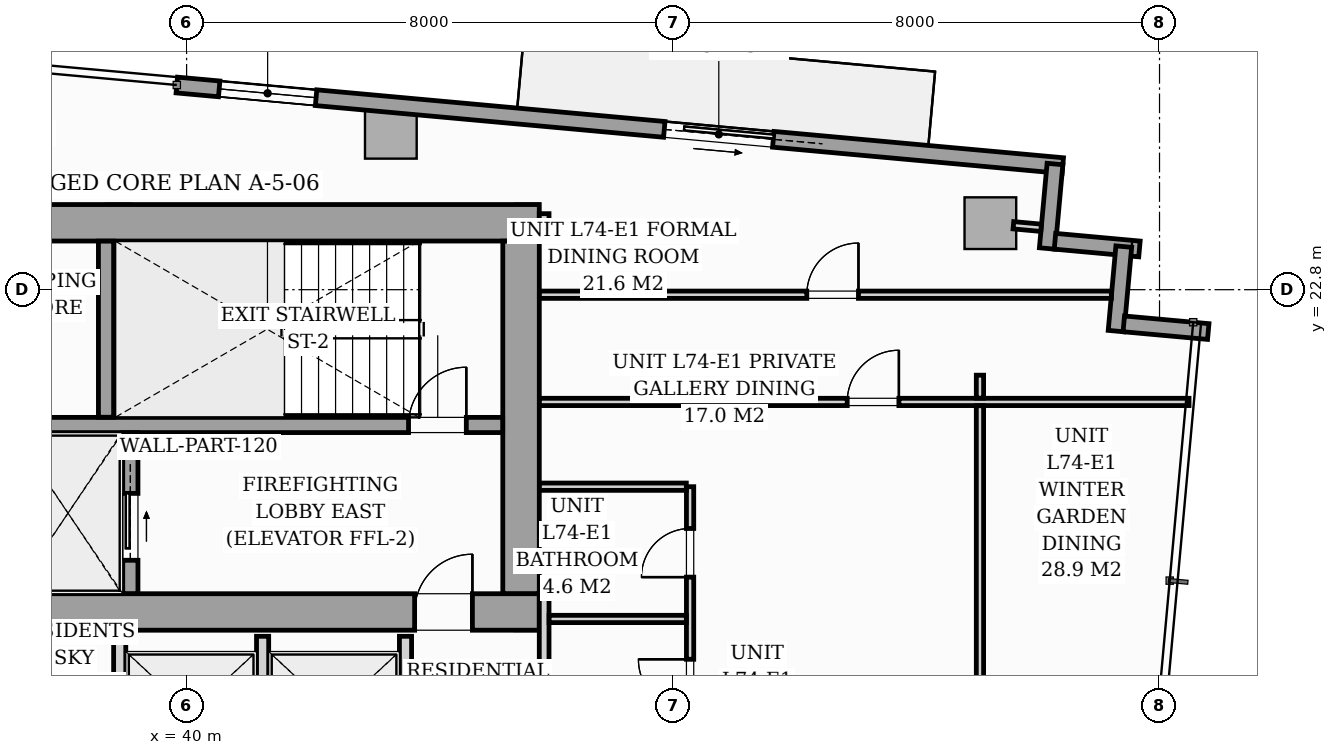
"""IFC4 building model, lengths in metres.
Left out: names, types, materials, properties, quantities, classifications, styles, units other than length and angle.
Written with IfcOpenShell. Run it as: python <this file> out.ifc"""

import sys

from ifc_helpers import new_model, si_unit, direction, frame, frame_2d, origin, origin_2d, place, context, subcontext, project, spatial, rectangle, i_section, extrude, source, transform, mapped, element, fill, save


model = new_model("IFC4")
c1 = context("Model", 3, precision=1e-05, world=origin(), true_north=direction((0.0, 1.0)))
c2 = subcontext(c1, "Body", "Model", "MODEL_VIEW")
j1 = project(units=[si_unit("LENGTHUNIT", "METRE"), si_unit("PLANEANGLEUNIT", "RADIAN")], contexts=[c1])
p1 = place(None, origin())
s1 = spatial("IfcSite", under=j1, at=p1, CompositionType="ELEMENT")
p2 = place(p1, origin())
s2 = spatial("IfcBuilding", under=s1, at=p2, CompositionType="ELEMENT")
p3 = place(p2, frame((0.0, 0.0, 256.2)))
s3 = spatial("IfcBuildingStorey", under=s2, at=p3, CompositionType="ELEMENT", Elevation=256.2)
m1 = source(origin(), c2, "Body", "SweptSolid", [
    extrude(i_section(OverallWidth=0.409, OverallDepth=0.425, WebThickness=0.033, FlangeThickness=0.052, FilletRadius=0.018, at=origin_2d()), origin(), (0.0, 0.0, 1.0), 3.296),
])
for number, where, z_axis, x_axis in (
    (1, (38.88, 17.4, 0.002), (0.0, 0.0, 1.0), (1.0, 0.0, 0.0)),
    (2, (45.6, 17.4, 0.002), (0.0, 0.0, 1.0), (1.0, 0.0, 0.0)),
    (3, (38.88, 24.0, 0.002), (0.0, 0.0, 1.0), (1.0, 0.0, 0.0)),
    (4, (45.6, 24.0, 0.002), (0.0, 0.0, 1.0), (1.0, 0.0, 0.0)),
):
    element("IfcColumn", number, at=place(p3, frame(where, z_axis=z_axis, x_axis=x_axis)), inside=s3, PredefinedType="PILASTER", context=c2, shape_type="MappedRepresentation", body=[
        mapped(m1, transform((0.0, 0.0, 0.0), scale=1.0)),
    ])
m2 = source(origin(), c2, "Body", "SweptSolid", [
    extrude(rectangle(XDim=0.85, YDim=0.85, at=origin_2d()), origin(), (0.0, 0.0, 1.0), 3.294),
])
for number, where, z_axis, x_axis in (
    (5, (43.359, 25.38, 0.002), (0.0, 0.0, 1.0), (0.996, -0.091, 0.0)),
    (6, (53.218, 23.894, 0.002), (0.0, 0.0, 1.0), (0.996, -0.091, 0.0)),
    (7, (54.889, 15.99, 0.002), (0.0, 0.0, 1.0), (0.996, -0.091, 0.0)),
):
    element("IfcColumn", number, at=place(p3, frame(where, z_axis=z_axis, x_axis=x_axis)), inside=s3, PredefinedType="COLUMN", context=c2, shape_type="MappedRepresentation", body=[
        mapped(m2, transform((0.0, 0.0, 0.0), scale=1.0)),
    ])
p4 = place(p3, frame((39.839, 26.166, 0.0), z_axis=(0.0, 0.0, 1.0), x_axis=(0.995884447498, -0.090632043071, 0.0)))
e8 = element("IfcWall", 8, at=p4, inside=s3, PredefinedType="STANDARD", context=c2, shape_type="SweptSolid", body=[
    extrude(rectangle(XDim=14.63, YDim=0.26, at=frame_2d((7.315, 0.0))), origin(), (0.0, 0.0, 1.0), 3.0),
])
p5 = place(p4, frame((8.05, 0.0, 0.0)))
e9 = element("IfcOpeningElement", 9, at=p5, cuts=e8, PredefinedType="OPENING", context=c2, shape_type="SweptSolid", body=[
    extrude(rectangle(XDim=1.8, YDim=2.06, at=frame_2d((0.9, 1.03))), frame((0.0, 0.14, 0.0), z_axis=(0.0, -1.0, 0.0), x_axis=(1.0, 0.0, 0.0)), (0.0, 0.0, 1.0), 0.28),
])
p6 = place(p4, frame((0.7, 0.0, 0.65)))
e10 = element("IfcOpeningElement", 10, at=p6, cuts=e8, PredefinedType="OPENING", context=c2, shape_type="SweptSolid", body=[
    extrude(rectangle(XDim=1.6, YDim=1.5, at=frame_2d((0.8, 0.75))), frame((0.0, 0.14, 0.0), z_axis=(0.0, -1.0, 0.0), x_axis=(1.0, 0.0, 0.0)), (0.0, 0.0, 1.0), 0.28),
])
p7 = place(p3, frame((54.281, 24.866, 0.0), z_axis=(0.0, 0.0, 1.0), x_axis=(-0.090661991521, -0.995881721538, 0.0)))
e11 = element("IfcWall", 11, at=p7, inside=s3, PredefinedType="STANDARD", context=c2, shape_type="SweptSolid", body=[
    extrude(rectangle(XDim=1.395, YDim=0.26, at=frame_2d((0.698, 0.0))), origin(), (0.0, 0.0, 1.0), 3.0),
])
for number, where, z_axis, x_axis in (
    (12, (54.281, 23.596, 0.0), (0.0, 0.0, 1.0), (0.996, -0.091, 0.0)),
    (13, (55.412, 23.508, 0.0), (0.0, 0.0, 1.0), (-0.091, -0.996, 0.0)),
    (14, (55.412, 22.238, 0.0), (0.0, 0.0, 1.0), (0.996, -0.091, 0.0)),
):
    element("IfcWall", number, at=place(p3, frame(where, z_axis=z_axis, x_axis=x_axis)), inside=s3, PredefinedType="STANDARD", context=c2, shape_type="SweptSolid", body=[
        extrude(rectangle(XDim=1.395, YDim=0.26, at=frame_2d((0.698, 0.0))), origin(), (0.0, 0.0, 1.0), 3.0),
    ])
p8 = place(p3, frame((26.2, 17.5, 0.0), z_axis=(0.0, 0.0, 1.0), x_axis=(1.0, 0.0, 0.0)))
e15 = element("IfcWall", 15, at=p8, inside=s3, PredefinedType="SHEAR", context=c2, shape_type="SweptSolid", body=[
    extrude(rectangle(XDim=19.6, YDim=0.6, at=frame_2d((9.8, 0.0))), origin(), (0.0, 0.0, 1.0), 3.3),
])
p9 = place(p8, frame((0.95, 0.0, 0.0)))
e16 = element("IfcOpeningElement", 16, at=p9, cuts=e15, PredefinedType="OPENING", context=c2, shape_type="SweptSolid", body=[
    extrude(rectangle(XDim=0.95, YDim=2.06, at=frame_2d((0.475, 1.03))), frame((0.0, 0.31, 0.0), z_axis=(0.0, -1.0, 0.0), x_axis=(1.0, 0.0, 0.0)), (0.0, 0.0, 1.0), 0.62),
])
p10 = place(p8, frame((9.38, 0.0, 0.0)))
e17 = element("IfcOpeningElement", 17, at=p10, cuts=e15, PredefinedType="OPENING", context=c2, shape_type="SweptSolid", body=[
    extrude(rectangle(XDim=0.85, YDim=2.0, at=frame_2d((0.425, 1.0))), frame((0.0, 0.31, 0.0), z_axis=(0.0, -1.0, 0.0), x_axis=(1.0, 0.0, 0.0)), (0.0, 0.0, 1.0), 0.62),
])
p11 = place(p8, frame((17.55, 0.0, 0.0)))
e18 = element("IfcOpeningElement", 18, at=p11, cuts=e15, PredefinedType="OPENING", context=c2, shape_type="SweptSolid", body=[
    extrude(rectangle(XDim=0.95, YDim=2.06, at=frame_2d((0.475, 1.03))), frame((0.0, 0.31, 0.0), z_axis=(0.0, -1.0, 0.0), x_axis=(1.0, 0.0, 0.0)), (0.0, 0.0, 1.0), 0.62),
])
p12 = place(p3, frame((26.2, 23.9, 0.0), z_axis=(0.0, 0.0, 1.0), x_axis=(1.0, 0.0, 0.0)))
e19 = element("IfcWall", 19, at=p12, inside=s3, PredefinedType="SHEAR", context=c2, shape_type="SweptSolid", body=[
    extrude(rectangle(XDim=19.6, YDim=0.6, at=frame_2d((9.8, 0.0))), origin(), (0.0, 0.0, 1.0), 3.3),
])
p13 = place(p3, frame((45.5, 17.802, 0.0), z_axis=(0.0, 0.0, 1.0), x_axis=(0.0, 1.0, 0.0)))
e20 = element("IfcWall", 20, at=p13, inside=s3, PredefinedType="SHEAR", context=c2, shape_type="SweptSolid", body=[
    extrude(rectangle(XDim=5.796, YDim=0.6, at=frame_2d((2.898, 0.0))), origin(), (0.0, 0.0, 1.0), 3.3),
])
p14 = place(p3, frame((37.05, 20.575, 0.0), z_axis=(0.0, 0.0, 1.0), x_axis=(1.0, 0.0, 0.0)))
e21 = element("IfcWall", 21, at=p14, inside=s3, PredefinedType="SOLIDWALL", context=c2, shape_type="SweptSolid", body=[
    extrude(rectangle(XDim=8.148, YDim=0.25, at=frame_2d((4.074, 0.0))), origin(), (0.0, 0.0, 1.0), 3.3),
])
p15 = place(p14, frame((6.6, 0.0, 0.0)))
e22 = element("IfcOpeningElement", 22, at=p15, cuts=e21, PredefinedType="OPENING", context=c2, shape_type="SweptSolid", body=[
    extrude(rectangle(XDim=0.95, YDim=2.06, at=frame_2d((0.475, 1.03))), frame((0.0, 0.135, 0.0), z_axis=(0.0, -1.0, 0.0), x_axis=(1.0, 0.0, 0.0)), (0.0, 0.0, 1.0), 0.27),
])
p16 = place(p3, frame((38.675, 20.702, 0.0), z_axis=(0.0, 0.0, 1.0), x_axis=(0.0, 1.0, 0.0)))
e23 = element("IfcWall", 23, at=p16, inside=s3, PredefinedType="SOLIDWALL", context=c2, shape_type="SweptSolid", body=[
    extrude(rectangle(XDim=2.896, YDim=0.25, at=frame_2d((1.448, 0.0))), origin(), (0.0, 0.0, 1.0), 3.3),
])
p17 = place(p3, frame((39.075, 17.802, 0.0), z_axis=(0.0, 0.0, 1.0), x_axis=(0.0, 1.0, 0.0)))
e24 = element("IfcWall", 24, at=p17, inside=s3, PredefinedType="SOLIDWALL", context=c2, shape_type="SweptSolid", body=[
    extrude(rectangle(XDim=2.646, YDim=0.25, at=frame_2d((1.323, 0.0))), origin(), (0.0, 0.0, 1.0), 3.3),
])
p18 = place(p17, frame((0.548, 0.0, 0.0)))
e25 = element("IfcOpeningElement", 25, at=p18, cuts=e24, PredefinedType="OPENING", context=c2, shape_type="SweptSolid", body=[
    extrude(rectangle(XDim=1.1, YDim=2.08, at=frame_2d((0.55, 1.04))), frame((0.0, 0.135, 0.0), z_axis=(0.0, -1.0, 0.0), x_axis=(1.0, 0.0, 0.0)), (0.0, 0.0, 1.0), 0.27),
])
for number, where, z_axis, x_axis in (
    (26, (38.9, 14.75, 0.0), (0.0, 0.0, 1.0), (0.0, 1.0, 0.0)),
    (27, (41.25, 14.75, 0.0), (0.0, 0.0, 1.0), (0.0, 1.0, 0.0)),
    (28, (43.6, 14.75, 0.0), (0.0, 0.0, 1.0), (0.0, 1.0, 0.0)),
):
    element("IfcWall", number, at=place(p3, frame(where, z_axis=z_axis, x_axis=x_axis)), inside=s3, PredefinedType="PARTITIONING", context=c2, shape_type="SweptSolid", body=[
        extrude(rectangle(XDim=2.35, YDim=0.2, at=frame_2d((1.175, 0.0))), origin(), (0.0, 0.0, 1.0), 3.0),
    ])
p19 = place(p3, frame((45.88, 13.442, 0.0), z_axis=(0.0, 0.0, 1.0), x_axis=(0.0, 1.0, 0.0)))
e29 = element("IfcWall", 29, at=p19, inside=s3, PredefinedType="PARTITIONING", context=c2, shape_type="SweptSolid", body=[
    extrude(rectangle(XDim=4.36, YDim=0.16, at=frame_2d((2.18, 0.0))), origin(), (0.0, 0.0, 1.0), 3.0),
])
p20 = place(p19, frame((0.493, 0.0, 0.0)))
e30 = element("IfcOpeningElement", 30, at=p20, cuts=e29, PredefinedType="OPENING", context=c2, shape_type="SweptSolid", body=[
    extrude(rectangle(XDim=0.95, YDim=2.06, at=frame_2d((0.475, 1.03))), frame((0.0, 0.09, 0.0), z_axis=(0.0, -1.0, 0.0), x_axis=(1.0, 0.0, 0.0)), (0.0, 0.0, 1.0), 0.18),
])
p21 = place(p3, frame((45.88, 23.598, 0.0), z_axis=(0.0, 0.0, 1.0), x_axis=(0.0, 1.0, 0.0)))
e31 = element("IfcWall", 31, at=p21, inside=s3, PredefinedType="PARTITIONING", context=c2, shape_type="SweptSolid", body=[
    extrude(rectangle(XDim=0.452, YDim=0.16, at=frame_2d((0.226, 0.0))), origin(), (0.0, 0.0, 1.0), 3.0),
])
p22 = place(p3, frame((48.28, 15.21, 0.0), z_axis=(0.0, 0.0, 1.0), x_axis=(0.0, 1.0, 0.0)))
e32 = element("IfcWall", 32, at=p22, inside=s3, PredefinedType="PARTITIONING", context=c2, shape_type="SweptSolid", body=[
    extrude(rectangle(XDim=4.35, YDim=0.12, at=frame_2d((2.175, 0.0))), origin(), (0.0, 0.0, 1.0), 3.0),
])
p23 = place(p22, frame((0.662, 0.0, 0.0)))
e33 = element("IfcOpeningElement", 33, at=p23, cuts=e32, PredefinedType="OPENING", context=c2, shape_type="SweptSolid", body=[
    extrude(rectangle(XDim=0.85, YDim=2.05, at=frame_2d((0.425, 1.025))), frame((0.0, 0.07, 0.0), z_axis=(0.0, -1.0, 0.0), x_axis=(1.0, 0.0, 0.0)), (0.0, 0.0, 1.0), 0.14),
])
p24 = place(p22, frame((2.863, 0.0, 0.0)))
e34 = element("IfcOpeningElement", 34, at=p24, cuts=e32, PredefinedType="OPENING", context=c2, shape_type="SweptSolid", body=[
    extrude(rectangle(XDim=0.8, YDim=2.02, at=frame_2d((0.4, 1.01))), frame((0.0, 0.07, 0.0), z_axis=(0.0, -1.0, 0.0), x_axis=(1.0, 0.0, 0.0)), (0.0, 0.0, 1.0), 0.14),
])
p25 = place(p3, frame((45.962, 17.385, 0.0), z_axis=(0.0, 0.0, 1.0), x_axis=(1.0, 0.0, 0.0)))
e35 = element("IfcWall", 35, at=p25, inside=s3, PredefinedType="PARTITIONING", context=c2, shape_type="SweptSolid", body=[
    extrude(rectangle(XDim=2.256, YDim=0.12, at=frame_2d((1.128, 0.0))), origin(), (0.0, 0.0, 1.0), 2.342),
])
p26 = place(p3, frame((45.802, 19.56, 0.0), z_axis=(0.0, 0.0, 1.0), x_axis=(1.0, 0.0, 0.0)))
e36 = element("IfcWall", 36, at=p26, inside=s3, PredefinedType="PARTITIONING", context=c2, shape_type="SweptSolid", body=[
    extrude(rectangle(XDim=2.416, YDim=0.12, at=frame_2d((1.208, 0.0))), origin(), (0.0, 0.0, 1.0), 3.0),
])
p27 = place(p3, frame((45.802, 22.717, 0.0), z_axis=(0.0, 0.0, 1.0), x_axis=(1.0, 0.0, 0.0)))
e37 = element("IfcWall", 37, at=p27, inside=s3, PredefinedType="PARTITIONING", context=c2, shape_type="SweptSolid", body=[
    extrude(rectangle(XDim=9.406, YDim=0.12, at=frame_2d((4.703, 0.0))), origin(), (0.0, 0.0, 1.0), 3.0),
])
p28 = place(p27, frame((4.397, 0.0, 0.0)))
e38 = element("IfcOpeningElement", 38, at=p28, cuts=e37, PredefinedType="OPENING", context=c2, shape_type="SweptSolid", body=[
    extrude(rectangle(XDim=0.85, YDim=2.05, at=frame_2d((0.425, 1.025))), frame((0.0, 0.07, 0.0), z_axis=(0.0, -1.0, 0.0), x_axis=(1.0, 0.0, 0.0)), (0.0, 0.0, 1.0), 0.14),
])
p29 = place(p3, frame((45.802, 20.954, 0.0), z_axis=(0.0, 0.0, 1.0), x_axis=(1.0, 0.0, 0.0)))
e39 = element("IfcWall", 39, at=p29, inside=s3, PredefinedType="PARTITIONING", context=c2, shape_type="SweptSolid", body=[
    extrude(rectangle(XDim=10.683, YDim=0.12, at=frame_2d((5.342, 0.0))), origin(), (0.0, 0.0, 1.0), 3.0),
])
p30 = place(p29, frame((5.062, 0.0, 0.0)))
e40 = element("IfcOpeningElement", 40, at=p30, cuts=e39, PredefinedType="OPENING", context=c2, shape_type="SweptSolid", body=[
    extrude(rectangle(XDim=0.85, YDim=2.05, at=frame_2d((0.425, 1.025))), frame((0.0, 0.07, 0.0), z_axis=(0.0, -1.0, 0.0), x_axis=(1.0, 0.0, 0.0)), (0.0, 0.0, 1.0), 0.14),
])
p31 = place(p3, frame((53.047, 10.808, 0.0), z_axis=(0.0, 0.0, 1.0), x_axis=(0.0, 1.0, 0.0)))
e41 = element("IfcWall", 41, at=p31, inside=s3, PredefinedType="PARTITIONING", context=c2, shape_type="SweptSolid", body=[
    extrude(rectangle(XDim=10.084, YDim=0.12, at=frame_2d((5.042, 0.0))), origin(), (0.0, 0.0, 1.0), 3.0),
])
p32 = place(p31, frame((3.54, 0.0, 0.0)))
e42 = element("IfcOpeningElement", 42, at=p32, cuts=e41, PredefinedType="OPENING", context=c2, shape_type="SweptSolid", body=[
    extrude(rectangle(XDim=0.85, YDim=2.05, at=frame_2d((0.425, 1.025))), frame((0.0, 0.07, 0.0), z_axis=(0.0, -1.0, 0.0), x_axis=(1.0, 0.0, 0.0)), (0.0, 0.0, 1.0), 0.14),
])
p33 = place(p3, frame((53.047, 21.016, 0.0), z_axis=(0.0, 0.0, 1.0), x_axis=(0.0, 1.0, 0.0)))
e43 = element("IfcWall", 43, at=p33, inside=s3, PredefinedType="PARTITIONING", context=c2, shape_type="SweptSolid", body=[
    extrude(rectangle(XDim=0.378, YDim=0.12, at=frame_2d((0.189, 0.0))), origin(), (0.0, 0.0, 1.0), 3.0),
])
p34 = place(p3, frame((53.597, 23.859, 0.0), z_axis=(0.0, 0.0, 1.0), x_axis=(0.995884462012, -0.090631883588, 0.0)))
e44 = element("IfcWall", 44, at=p34, inside=s3, PredefinedType="PARTITIONING", context=c2, shape_type="SweptSolid", body=[
    extrude(rectangle(XDim=0.458, YDim=0.12, at=frame_2d((0.229, 0.0))), origin(), (0.0, 0.0, 1.0), 3.0),
])
m3 = source(origin(), c2, "Body", "SweptSolid", [
    extrude(rectangle(XDim=1.8, YDim=2.06, at=frame_2d((0.9, 1.03))), frame((0.0, 0.025, 0.0), z_axis=(0.0, -1.0, 0.0), x_axis=(1.0, 0.0, 0.0)), (0.0, 0.0, 1.0), 0.05),
])
p35 = place(p5, origin())
e45 = element("IfcDoor", 45, at=p35, inside=s3, OperationType="SLIDING_TO_RIGHT", PredefinedType="DOOR", context=c2, shape_type="MappedRepresentation", body=[
    mapped(m3, transform((0.0, 0.0, 0.0), scale=1.0)),
])
fill(e9, e45)
m4 = source(origin(), c2, "Body", "SweptSolid", [
    extrude(rectangle(XDim=1.6, YDim=1.5, at=frame_2d((0.8, 0.75))), frame((0.0, 0.03, 0.0), z_axis=(0.0, -1.0, 0.0), x_axis=(1.0, 0.0, 0.0)), (0.0, 0.0, 1.0), 0.06),
])
p36 = place(p6, origin())
e46 = element("IfcWindow", 46, at=p36, inside=s3, PartitioningType="SINGLE_PANEL", PredefinedType="WINDOW", context=c2, shape_type="MappedRepresentation", body=[
    mapped(m4, transform((0.0, 0.0, 0.0), scale=1.0)),
])
fill(e10, e46)
m5 = source(origin(), c2, "Body", "SweptSolid", [
    extrude(rectangle(XDim=0.95, YDim=2.06, at=frame_2d((0.475, 1.03))), frame((0.0, 0.025, 0.0), z_axis=(0.0, -1.0, 0.0), x_axis=(1.0, 0.0, 0.0)), (0.0, 0.0, 1.0), 0.05),
])
p37 = place(p11, origin())
e47 = element("IfcDoor", 47, at=p37, inside=s3, OperationType="SINGLE_SWING_RIGHT", PredefinedType="DOOR", context=c2, shape_type="MappedRepresentation", body=[
    mapped(m5, transform((0.0, 0.0, 0.0), scale=1.0)),
])
fill(e18, e47)
p38 = place(p15, origin())
e48 = element("IfcDoor", 48, at=p38, inside=s3, OperationType="SINGLE_SWING_RIGHT", PredefinedType="DOOR", context=c2, shape_type="MappedRepresentation", body=[
    mapped(m5, transform((0.0, 0.0, 0.0), scale=1.0)),
])
fill(e22, e48)
m6 = source(origin(), c2, "Body", "SweptSolid", [
    extrude(rectangle(XDim=1.1, YDim=2.08, at=frame_2d((0.55, 1.04))), frame((0.0, 0.025, 0.0), z_axis=(0.0, -1.0, 0.0), x_axis=(1.0, 0.0, 0.0)), (0.0, 0.0, 1.0), 0.05),
])
p39 = place(p18, origin())
e49 = element("IfcDoor", 49, at=p39, inside=s3, OperationType="SLIDING_TO_RIGHT", PredefinedType="DOOR", context=c2, shape_type="MappedRepresentation", body=[
    mapped(m6, transform((0.0, 0.0, 0.0), scale=1.0)),
])
fill(e25, e49)
m7 = source(origin(), c2, "Body", "SweptSolid", [
    extrude(rectangle(XDim=0.85, YDim=2.05, at=frame_2d((0.425, 1.025))), frame((0.0, 0.025, 0.0), z_axis=(0.0, -1.0, 0.0), x_axis=(1.0, 0.0, 0.0)), (0.0, 0.0, 1.0), 0.05),
])
p40 = place(p23, origin())
e50 = element("IfcDoor", 50, at=p40, inside=s3, OperationType="SINGLE_SWING_RIGHT", PredefinedType="DOOR", context=c2, shape_type="MappedRepresentation", body=[
    mapped(m7, transform((0.0, 0.0, 0.0), scale=1.0)),
])
fill(e33, e50)
m8 = source(origin(), c2, "Body", "SweptSolid", [
    extrude(rectangle(XDim=0.8, YDim=2.02, at=frame_2d((0.4, 1.01))), frame((0.0, 0.025, 0.0), z_axis=(0.0, -1.0, 0.0), x_axis=(1.0, 0.0, 0.0)), (0.0, 0.0, 1.0), 0.05),
])
p41 = place(p24, origin())
e51 = element("IfcDoor", 51, at=p41, inside=s3, OperationType="SINGLE_SWING_LEFT", PredefinedType="DOOR", context=c2, shape_type="MappedRepresentation", body=[
    mapped(m8, transform((0.0, 0.0, 0.0), scale=1.0)),
])
fill(e34, e51)
p42 = place(p28, origin())
e52 = element("IfcDoor", 52, at=p42, inside=s3, OperationType="SINGLE_SWING_RIGHT", PredefinedType="DOOR", context=c2, shape_type="MappedRepresentation", body=[
    mapped(m7, transform((0.0, 0.0, 0.0), scale=1.0)),
])
fill(e38, e52)
p43 = place(p30, origin())
e53 = element("IfcDoor", 53, at=p43, inside=s3, OperationType="SINGLE_SWING_RIGHT", PredefinedType="DOOR", context=c2, shape_type="MappedRepresentation", body=[
    mapped(m7, transform((0.0, 0.0, 0.0), scale=1.0)),
])
fill(e40, e53)
save(model, sys.argv[1])
